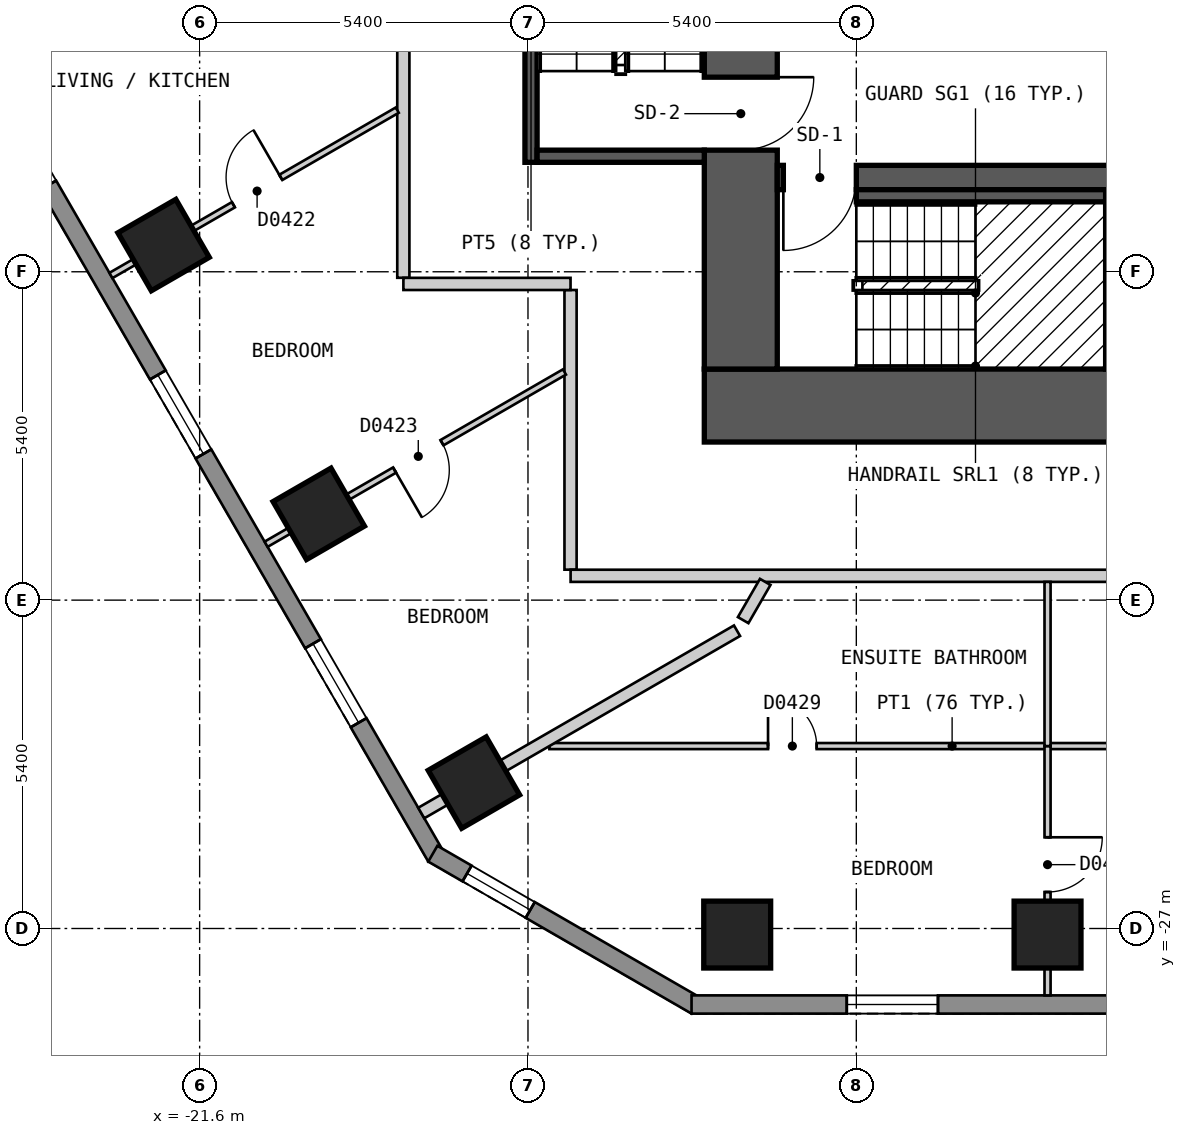
"""IFC4 building model, lengths in metres.
Left out: names, types, materials, properties, quantities, classifications, styles, units other than length and angle.
Written with IfcOpenShell. Run it as: python <this file> out.ifc"""

import sys

from ifc_helpers import new_model, si_unit, direction, frame, frame_2d, origin, origin_2d, place, context, subcontext, project, spatial, polyline, rectangle, outline, extrude, element, fill, save


model = new_model("IFC4")
c1 = context("Model", 3, precision=1e-05, world=origin(), true_north=direction((0.0, 1.0)))
c2 = subcontext(c1, "Body", "Model", "MODEL_VIEW")
j1 = project(units=[si_unit("LENGTHUNIT", "METRE"), si_unit("PLANEANGLEUNIT", "RADIAN")], contexts=[c1])
p1 = place(None, origin())
s1 = spatial("IfcSite", under=j1, at=p1, CompositionType="ELEMENT")
p2 = place(p1, origin())
s2 = spatial("IfcBuilding", under=s1, at=p2, CompositionType="ELEMENT")
p3 = place(p2, frame((0.0, 0.0, 38.4)))
s3 = spatial("IfcBuildingStorey", under=s2, at=p3, CompositionType="ELEMENT", Elevation=38.4)
for number, where, z_axis, x_axis in (
    (1, (-22.193, -15.761, 0.0), (0.0, 0.0, 1.0), (0.5, -0.866, 0.0)),
    (2, (-19.641, -20.181, 0.0), (0.0, 0.0, 1.0), (0.5, -0.866, 0.0)),
    (3, (-17.089, -24.601, 0.0), (0.0, 0.0, 1.0), (0.5, -0.866, 0.0)),
    (4, (-12.759, -27.1, 0.0), (0.0, 0.0, 1.0), (1.0, 0.0, 0.0)),
    (5, (-7.655, -27.1, 0.0), (0.0, 0.0, 1.0), (1.0, 0.0, 0.0)),
):
    element("IfcColumn", number, at=place(p3, frame(where, z_axis=z_axis, x_axis=x_axis)), inside=s3, PredefinedType="COLUMN", context=c2, shape_type="SweptSolid", body=[
        extrude(rectangle(XDim=1.1, YDim=1.1, at=origin_2d()), origin(), (0.0, 0.0, 1.0), 3.0),
    ])
p4 = place(p3, frame((-13.3, -18.4, 0.0), z_axis=(0.0, 0.0, 1.0), x_axis=(1.0, 0.0, 0.0)))
e6 = element("IfcWall", 6, at=p4, inside=s3, PredefinedType="SHEAR", context=c2, shape_type="SweptSolid", body=[
    extrude(rectangle(XDim=26.6, YDim=1.2, at=frame_2d((13.3, 0.0))), origin(), (0.0, 0.0, 1.0), 2.7),
])
p5 = place(p3, frame((-12.7, -17.8, 0.0), z_axis=(0.0, 0.0, 1.0), x_axis=(0.0, 1.0, 0.0)))
e7 = element("IfcWall", 7, at=p5, inside=s3, PredefinedType="SHEAR", context=c2, shape_type="SweptSolid", body=[
    extrude(rectangle(XDim=11.6, YDim=1.2, at=frame_2d((5.8, 0.0))), origin(), (0.0, 0.0, 1.0), 2.7),
])
p6 = place(p5, frame((3.6, 0.0, 0.0)))
e8 = element("IfcOpeningElement", 8, at=p6, cuts=e7, PredefinedType="OPENING", context=c2, shape_type="SweptSolid", body=[
    extrude(rectangle(XDim=1.2, YDim=2.1, at=frame_2d((0.6, 1.05))), frame((0.0, 0.61, 0.0), z_axis=(0.0, -1.0, 0.0), x_axis=(1.0, 0.0, 0.0)), (0.0, 0.0, 1.0), 1.22),
])
p7 = place(p3, frame((-12.1, -14.65, 0.0), z_axis=(0.0, 0.0, 1.0), x_axis=(1.0, 0.0, 0.0)))
e9 = element("IfcWall", 9, at=p7, inside=s3, PredefinedType="SHEAR", context=c2, shape_type="SweptSolid", body=[
    extrude(rectangle(XDim=24.2, YDim=0.4, at=frame_2d((12.1, 0.0))), origin(), (0.0, 0.0, 1.0), 2.7),
])
p8 = place(p7, frame((1.3, 0.0, 0.0), z_axis=(0.0, 0.0, 1.0), x_axis=(-1.0, 0.0, 0.0)))
e10 = element("IfcOpeningElement", 10, at=p8, cuts=e9, PredefinedType="OPENING", context=c2, shape_type="SweptSolid", body=[
    extrude(rectangle(XDim=1.2, YDim=2.1, at=frame_2d((0.6, 1.05))), frame((0.0, 0.21, 0.0), z_axis=(0.0, -1.0, 0.0), x_axis=(1.0, 0.0, 0.0)), (0.0, 0.0, 1.0), 0.42),
])
p9 = place(p7, frame((24.15, 0.0, 0.0), z_axis=(0.0, 0.0, 1.0), x_axis=(-1.0, 0.0, 0.0)))
e11 = element("IfcOpeningElement", 11, at=p9, cuts=e9, PredefinedType="OPENING", context=c2, shape_type="SweptSolid", body=[
    extrude(rectangle(XDim=1.2, YDim=2.1, at=frame_2d((0.6, 1.05))), frame((0.0, 0.21, 0.0), z_axis=(0.0, -1.0, 0.0), x_axis=(1.0, 0.0, 0.0)), (0.0, 0.0, 1.0), 0.42),
])
p10 = place(p7, frame((17.2, 0.0, 0.0), z_axis=(0.0, 0.0, 1.0), x_axis=(-1.0, 0.0, 0.0)))
e12 = element("IfcOpeningElement", 12, at=p10, cuts=e9, PredefinedType="OPENING", context=c2, shape_type="SweptSolid", body=[
    extrude(rectangle(XDim=1.0, YDim=2.1, at=frame_2d((0.5, 1.05))), frame((0.0, 0.21, 0.0), z_axis=(0.0, -1.0, 0.0), x_axis=(1.0, 0.0, 0.0)), (0.0, 0.0, 1.0), 0.42),
])
p11 = place(p3, frame((-31.22, -2.425, 0.0), z_axis=(0.0, 0.0, 1.0), x_axis=(0.500001938803, -0.866024284413, 0.0)))
e13 = element("IfcWall", 13, at=p11, inside=s3, PredefinedType="SOLIDWALL", context=c2, shape_type="SweptSolid", body=[
    extrude(outline(polyline([(0.0, -0.15), (27.02, -0.15), (26.94, 0.15), (0.08, 0.15), (0.0, -0.15)])), origin(), (0.0, 0.0, 1.0), 2.7),
])
p12 = place(p11, frame((2.553, 0.0, 0.15)))
e14 = element("IfcOpeningElement", 14, at=p12, cuts=e13, PredefinedType="OPENING", context=c2, shape_type="SweptSolid", body=[
    extrude(rectangle(XDim=1.5, YDim=2.1, at=frame_2d((0.75, 1.05))), frame((0.0, 0.16, 0.0), z_axis=(0.0, -1.0, 0.0), x_axis=(1.0, 0.0, 0.0)), (0.0, 0.0, 1.0), 0.32),
])
p13 = place(p11, frame((7.657, 0.0, 0.15)))
e15 = element("IfcOpeningElement", 15, at=p13, cuts=e13, PredefinedType="OPENING", context=c2, shape_type="SweptSolid", body=[
    extrude(rectangle(XDim=1.5, YDim=2.1, at=frame_2d((0.75, 1.05))), frame((0.0, 0.16, 0.0), z_axis=(0.0, -1.0, 0.0), x_axis=(1.0, 0.0, 0.0)), (0.0, 0.0, 1.0), 0.32),
])
p14 = place(p11, frame((12.761, 0.0, 0.15)))
e16 = element("IfcOpeningElement", 16, at=p14, cuts=e13, PredefinedType="OPENING", context=c2, shape_type="SweptSolid", body=[
    extrude(rectangle(XDim=1.5, YDim=2.1, at=frame_2d((0.75, 1.05))), frame((0.0, 0.16, 0.0), z_axis=(0.0, -1.0, 0.0), x_axis=(1.0, 0.0, 0.0)), (0.0, 0.0, 1.0), 0.32),
])
p15 = place(p11, frame((17.865, 0.0, 0.15)))
e17 = element("IfcOpeningElement", 17, at=p15, cuts=e13, PredefinedType="OPENING", context=c2, shape_type="SweptSolid", body=[
    extrude(rectangle(XDim=1.5, YDim=2.1, at=frame_2d((0.75, 1.05))), frame((0.0, 0.16, 0.0), z_axis=(0.0, -1.0, 0.0), x_axis=(1.0, 0.0, 0.0)), (0.0, 0.0, 1.0), 0.32),
])
p16 = place(p11, frame((22.969, 0.0, 0.15)))
e18 = element("IfcOpeningElement", 18, at=p16, cuts=e13, PredefinedType="OPENING", context=c2, shape_type="SweptSolid", body=[
    extrude(rectangle(XDim=1.5, YDim=2.1, at=frame_2d((0.75, 1.05))), frame((0.0, 0.16, 0.0), z_axis=(0.0, -1.0, 0.0), x_axis=(1.0, 0.0, 0.0)), (0.0, 0.0, 1.0), 0.32),
])
p17 = place(p3, frame((-17.765, -25.77, 0.0), z_axis=(0.0, 0.0, 1.0), x_axis=(0.866010750942, -0.50002537861, 0.0)))
e19 = element("IfcWall", 19, at=p17, inside=s3, PredefinedType="SOLIDWALL", context=c2, shape_type="SweptSolid", body=[
    extrude(outline(polyline([(0.0, -0.15), (5.0, -0.15), (4.919, 0.15), (0.08, 0.15), (0.0, -0.15)])), origin(), (0.0, 0.0, 1.0), 2.7),
])
p18 = place(p17, frame((0.65, 0.0, 0.15)))
e20 = element("IfcOpeningElement", 20, at=p18, cuts=e19, PredefinedType="OPENING", context=c2, shape_type="SweptSolid", body=[
    extrude(rectangle(XDim=1.2, YDim=2.1, at=frame_2d((0.6, 1.05))), frame((0.0, 0.16, 0.0), z_axis=(0.0, -1.0, 0.0), x_axis=(1.0, 0.0, 0.0)), (0.0, 0.0, 1.0), 0.32),
])
p19 = place(p3, frame((-13.51, -28.25, 0.0), z_axis=(0.0, 0.0, 1.0), x_axis=(1.0, 0.0, 0.0)))
e21 = element("IfcWall", 21, at=p19, inside=s3, PredefinedType="SOLIDWALL", context=c2, shape_type="SweptSolid", body=[
    extrude(outline(polyline([(0.0, -0.15), (27.02, -0.15), (26.94, 0.15), (0.08, 0.15), (0.0, -0.15)])), origin(), (0.0, 0.0, 1.0), 2.7),
])
p20 = place(p19, frame((2.553, 0.0, 0.15)))
e22 = element("IfcOpeningElement", 22, at=p20, cuts=e21, PredefinedType="OPENING", context=c2, shape_type="SweptSolid", body=[
    extrude(rectangle(XDim=1.5, YDim=2.1, at=frame_2d((0.75, 1.05))), frame((0.0, 0.16, 0.0), z_axis=(0.0, -1.0, 0.0), x_axis=(1.0, 0.0, 0.0)), (0.0, 0.0, 1.0), 0.32),
])
p21 = place(p19, frame((7.657, 0.0, 0.15)))
e23 = element("IfcOpeningElement", 23, at=p21, cuts=e21, PredefinedType="OPENING", context=c2, shape_type="SweptSolid", body=[
    extrude(rectangle(XDim=1.5, YDim=2.1, at=frame_2d((0.75, 1.05))), frame((0.0, 0.16, 0.0), z_axis=(0.0, -1.0, 0.0), x_axis=(1.0, 0.0, 0.0)), (0.0, 0.0, 1.0), 0.32),
])
p22 = place(p19, frame((12.761, 0.0, 0.15)))
e24 = element("IfcOpeningElement", 24, at=p22, cuts=e21, PredefinedType="OPENING", context=c2, shape_type="SweptSolid", body=[
    extrude(rectangle(XDim=1.5, YDim=2.1, at=frame_2d((0.75, 1.05))), frame((0.0, 0.16, 0.0), z_axis=(0.0, -1.0, 0.0), x_axis=(1.0, 0.0, 0.0)), (0.0, 0.0, 1.0), 0.32),
])
p23 = place(p19, frame((17.865, 0.0, 0.15)))
e25 = element("IfcOpeningElement", 25, at=p23, cuts=e21, PredefinedType="OPENING", context=c2, shape_type="SweptSolid", body=[
    extrude(rectangle(XDim=1.5, YDim=2.1, at=frame_2d((0.75, 1.05))), frame((0.0, 0.16, 0.0), z_axis=(0.0, -1.0, 0.0), x_axis=(1.0, 0.0, 0.0)), (0.0, 0.0, 1.0), 0.32),
])
p24 = place(p19, frame((22.969, 0.0, 0.15)))
e26 = element("IfcOpeningElement", 26, at=p24, cuts=e21, PredefinedType="OPENING", context=c2, shape_type="SweptSolid", body=[
    extrude(rectangle(XDim=1.5, YDim=2.1, at=frame_2d((0.75, 1.05))), frame((0.0, 0.16, 0.0), z_axis=(0.0, -1.0, 0.0), x_axis=(1.0, 0.0, 0.0)), (0.0, 0.0, 1.0), 0.32),
])
p25 = place(p3, frame((-15.5, -16.5, 0.0), z_axis=(0.0, 0.0, 1.0), x_axis=(0.0, -1.0, 0.0)))
e27 = element("IfcWall", 27, at=p25, inside=s3, PredefinedType="PARTITIONING", context=c2, shape_type="SweptSolid", body=[
    extrude(rectangle(XDim=4.599, YDim=0.2, at=frame_2d((2.3, 0.0))), origin(), (0.0, 0.0, 1.0), 2.7),
])
p26 = place(p3, frame((-18.25, -11.507, 0.0), z_axis=(0.0, 0.0, 1.0), x_axis=(0.0, -1.0, 0.0)))
e28 = element("IfcWall", 28, at=p26, inside=s3, PredefinedType="PARTITIONING", context=c2, shape_type="SweptSolid", body=[
    extrude(rectangle(XDim=4.792, YDim=0.2, at=frame_2d((2.396, 0.0))), origin(), (0.0, 0.0, 1.0), 2.7),
])
p27 = place(p3, frame((-18.249, -16.4, 0.0), z_axis=(0.0, 0.0, 1.0), x_axis=(1.0, 0.0, 0.0)))
e29 = element("IfcWall", 29, at=p27, inside=s3, PredefinedType="PARTITIONING", context=c2, shape_type="SweptSolid", body=[
    extrude(rectangle(XDim=2.749, YDim=0.2, at=frame_2d((1.375, 0.0))), origin(), (0.0, 0.0, 1.0), 2.7),
])
p28 = place(p3, frame((-15.499, -21.2, 0.0), z_axis=(0.0, 0.0, 1.0), x_axis=(1.0, 0.0, 0.0)))
e30 = element("IfcWall", 30, at=p28, inside=s3, PredefinedType="PARTITIONING", context=c2, shape_type="SweptSolid", body=[
    extrude(rectangle(XDim=30.898, YDim=0.2, at=frame_2d((15.449, 0.0))), origin(), (0.0, 0.0, 1.0), 2.7),
])
p29 = place(p28, frame((15.0, 0.0, 0.0)))
e31 = element("IfcOpeningElement", 31, at=p29, cuts=e30, PredefinedType="OPENING", context=c2, shape_type="SweptSolid", body=[
    extrude(rectangle(XDim=1.0, YDim=2.1, at=frame_2d((0.5, 1.05))), frame((0.0, 0.11, 0.0), z_axis=(0.0, -1.0, 0.0), x_axis=(1.0, 0.0, 0.0)), (0.0, 0.0, 1.0), 0.22),
])
p30 = place(p28, frame((20.104, 0.0, 0.0)))
e32 = element("IfcOpeningElement", 32, at=p30, cuts=e30, PredefinedType="OPENING", context=c2, shape_type="SweptSolid", body=[
    extrude(rectangle(XDim=1.0, YDim=2.1, at=frame_2d((0.5, 1.05))), frame((0.0, 0.11, 0.0), z_axis=(0.0, -1.0, 0.0), x_axis=(1.0, 0.0, 0.0)), (0.0, 0.0, 1.0), 0.22),
])
p31 = place(p3, frame((-15.848, -24.0, 0.0), z_axis=(0.0, 0.0, 1.0), x_axis=(1.0, 0.0, 0.0)))
e33 = element("IfcWall", 33, at=p31, inside=s3, PredefinedType="PARTITIONING", context=c2, shape_type="SweptSolid", body=[
    extrude(rectangle(XDim=13.247, YDim=0.1, at=frame_2d((6.624, 0.0))), origin(), (0.0, 0.0, 1.0), 2.7),
])
p32 = place(p31, frame((3.596, 0.0, 0.0)))
e34 = element("IfcOpeningElement", 34, at=p32, cuts=e33, PredefinedType="OPENING", context=c2, shape_type="SweptSolid", body=[
    extrude(rectangle(XDim=0.8, YDim=2.1, at=frame_2d((0.4, 1.05))), frame((0.0, 0.06, 0.0), z_axis=(0.0, -1.0, 0.0), x_axis=(1.0, 0.0, 0.0)), (0.0, 0.0, 1.0), 0.12),
])
p33 = place(p31, frame((10.345, 0.0, 0.0)))
e35 = element("IfcOpeningElement", 35, at=p33, cuts=e33, PredefinedType="OPENING", context=c2, shape_type="SweptSolid", body=[
    extrude(rectangle(XDim=0.8, YDim=2.1, at=frame_2d((0.4, 1.05))), frame((0.0, 0.06, 0.0), z_axis=(0.0, -1.0, 0.0), x_axis=(1.0, 0.0, 0.0)), (0.0, 0.0, 1.0), 0.12),
])
p34 = place(p3, frame((-7.655, -28.1, 0.0), z_axis=(0.0, 0.0, 1.0), x_axis=(0.0, 1.0, 0.0)))
e36 = element("IfcWall", 36, at=p34, inside=s3, PredefinedType="PARTITIONING", context=c2, shape_type="SweptSolid", body=[
    extrude(rectangle(XDim=4.1, YDim=0.1, at=frame_2d((2.05, 0.0))), origin(), (0.0, 0.0, 1.0), 2.7),
])
p35 = place(p34, frame((1.7, 0.0, 0.0)))
e37 = element("IfcOpeningElement", 37, at=p35, cuts=e36, PredefinedType="OPENING", context=c2, shape_type="SweptSolid", body=[
    extrude(rectangle(XDim=0.9, YDim=2.1, at=frame_2d((0.45, 1.05))), frame((0.0, 0.06, 0.0), z_axis=(0.0, -1.0, 0.0), x_axis=(1.0, 0.0, 0.0)), (0.0, 0.0, 1.0), 0.12),
])
p36 = place(p3, frame((-20.507, -20.681, 0.0), z_axis=(0.0, 0.0, 1.0), x_axis=(0.866028446103, 0.499994730513, 0.0)))
e38 = element("IfcWall", 38, at=p36, inside=s3, PredefinedType="PARTITIONING", context=c2, shape_type="SweptSolid", body=[
    extrude(rectangle(XDim=5.666, YDim=0.1, at=frame_2d((2.833, 0.0))), origin(), (0.0, 0.0, 1.0), 2.7),
])
p37 = place(p36, frame((2.44, 0.0, 0.0)))
e39 = element("IfcOpeningElement", 39, at=p37, cuts=e38, PredefinedType="OPENING", context=c2, shape_type="SweptSolid", body=[
    extrude(rectangle(XDim=0.9, YDim=2.1, at=frame_2d((0.45, 1.05))), frame((0.0, 0.06, 0.0), z_axis=(0.0, -1.0, 0.0), x_axis=(1.0, 0.0, 0.0)), (0.0, 0.0, 1.0), 0.12),
])
p38 = place(p3, frame((-23.059, -16.261, 0.0), z_axis=(0.0, 0.0, 1.0), x_axis=(0.866004639177, 0.500035963631, 0.0)))
e40 = element("IfcWall", 40, at=p38, inside=s3, PredefinedType="PARTITIONING", context=c2, shape_type="SweptSolid", body=[
    extrude(rectangle(XDim=5.438, YDim=0.1, at=frame_2d((2.719, 0.0))), origin(), (0.0, 0.0, 1.0), 2.7),
])
p39 = place(p38, frame((2.326, 0.0, 0.0)))
e41 = element("IfcOpeningElement", 41, at=p39, cuts=e40, PredefinedType="OPENING", context=c2, shape_type="SweptSolid", body=[
    extrude(rectangle(XDim=0.9, YDim=2.1, at=frame_2d((0.45, 1.05))), frame((0.0, 0.06, 0.0), z_axis=(0.0, -1.0, 0.0), x_axis=(1.0, 0.0, 0.0)), (0.0, 0.0, 1.0), 0.12),
])
p40 = place(p3, frame((-12.661, -21.929, 0.0), z_axis=(0.0, 0.0, 1.0), x_axis=(0.499683639304, 0.866207977689, 0.0)))
e42 = element("IfcWall", 42, at=p40, inside=s3, PredefinedType="PARTITIONING", context=c2, shape_type="SweptSolid", body=[
    extrude(rectangle(XDim=0.726, YDim=0.2, at=frame_2d((0.363, 0.0))), origin(), (0.0, 0.0, 1.0), 2.7),
])
p41 = place(p3, frame((-17.955, -25.101, 0.0), z_axis=(0.0, 0.0, 1.0), x_axis=(0.866039817231, 0.499975034347, 0.0)))
e43 = element("IfcWall", 43, at=p41, inside=s3, PredefinedType="PARTITIONING", context=c2, shape_type="SweptSolid", body=[
    extrude(rectangle(XDim=5.996, YDim=0.2, at=frame_2d((2.998, 0.0))), origin(), (0.0, 0.0, 1.0), 2.7),
])
p42 = place(p3, frame((-7.655, -24.0, 0.0), z_axis=(0.0, 0.0, 1.0), x_axis=(0.0, 1.0, 0.0)))
e44 = element("IfcWall", 44, at=p42, inside=s3, PredefinedType="PARTITIONING", context=c2, shape_type="SweptSolid", body=[
    extrude(rectangle(XDim=2.7, YDim=0.1, at=frame_2d((1.35, 0.0))), origin(), (0.0, 0.0, 1.0), 2.7),
])
p43 = place(p3, frame((-16.15, -14.4, 0.0), z_axis=(0.0, 0.0, 1.0), x_axis=(0.0, 1.0, 0.0)))
e45 = element("IfcWall", 45, at=p43, inside=s3, PredefinedType="SOLIDWALL", context=c2, shape_type="SweptSolid", body=[
    extrude(rectangle(XDim=5.8, YDim=0.2, at=frame_2d((2.9, 0.0))), origin(), (0.0, 0.0, 1.0), 2.7),
])
p44 = place(p3, frame((-16.05, -14.3, 0.0), z_axis=(0.0, 0.0, 1.0), x_axis=(1.0, 0.0, 0.0)))
e46 = element("IfcWall", 46, at=p44, inside=s3, PredefinedType="SOLIDWALL", context=c2, shape_type="SweptSolid", body=[
    extrude(rectangle(XDim=2.75, YDim=0.2, at=frame_2d((1.375, 0.0))), origin(), (0.0, 0.0, 1.0), 2.7),
])
p45 = place(p3, frame((-10.8, -14.95, 0.0), z_axis=(0.0, 0.0, 1.0), x_axis=(1.0, 0.0, 0.0)))
e47 = element("IfcWall", 47, at=p45, inside=s3, PredefinedType="SOLIDWALL", context=c2, shape_type="SweptSolid", body=[
    extrude(rectangle(XDim=4.1, YDim=0.2, at=frame_2d((2.05, 0.0))), origin(), (0.0, 0.0, 1.0), 2.7),
])
p46 = place(p15, origin())
e48 = element("IfcWindow", 48, at=p46, inside=s3, PartitioningType="SINGLE_PANEL", PredefinedType="WINDOW", context=c2, shape_type="SweptSolid", body=[
    extrude(rectangle(XDim=1.5, YDim=2.1, at=frame_2d((0.75, 1.05))), frame((0.0, 0.03, 0.0), z_axis=(0.0, -1.0, 0.0), x_axis=(1.0, 0.0, 0.0)), (0.0, 0.0, 1.0), 0.06),
])
fill(e17, e48)
p47 = place(p16, origin())
e49 = element("IfcWindow", 49, at=p47, inside=s3, PartitioningType="SINGLE_PANEL", PredefinedType="WINDOW", context=c2, shape_type="SweptSolid", body=[
    extrude(rectangle(XDim=1.5, YDim=2.1, at=frame_2d((0.75, 1.05))), frame((0.0, 0.03, 0.0), z_axis=(0.0, -1.0, 0.0), x_axis=(1.0, 0.0, 0.0)), (0.0, 0.0, 1.0), 0.06),
])
fill(e18, e49)
p48 = place(p18, origin())
e50 = element("IfcWindow", 50, at=p48, inside=s3, PartitioningType="SINGLE_PANEL", PredefinedType="WINDOW", context=c2, shape_type="SweptSolid", body=[
    extrude(rectangle(XDim=1.2, YDim=2.1, at=frame_2d((0.6, 1.05))), frame((0.0, 0.03, 0.0), z_axis=(0.0, -1.0, 0.0), x_axis=(1.0, 0.0, 0.0)), (0.0, 0.0, 1.0), 0.06),
])
fill(e20, e50)
p49 = place(p20, origin())
e51 = element("IfcWindow", 51, at=p49, inside=s3, PartitioningType="SINGLE_PANEL", PredefinedType="WINDOW", context=c2, shape_type="SweptSolid", body=[
    extrude(rectangle(XDim=1.5, YDim=2.1, at=frame_2d((0.75, 1.05))), frame((0.0, 0.03, 0.0), z_axis=(0.0, -1.0, 0.0), x_axis=(1.0, 0.0, 0.0)), (0.0, 0.0, 1.0), 0.06),
])
fill(e22, e51)
p50 = place(p39, origin())
e52 = element("IfcDoor", 52, at=p50, inside=s3, OperationType="SINGLE_SWING_RIGHT", PredefinedType="DOOR", context=c2, shape_type="SweptSolid", body=[
    extrude(rectangle(XDim=0.9, YDim=2.1, at=frame_2d((0.45, 1.05))), frame((0.0, 0.025, 0.0), z_axis=(0.0, -1.0, 0.0), x_axis=(1.0, 0.0, 0.0)), (0.0, 0.0, 1.0), 0.05),
])
fill(e41, e52)
p51 = place(p37, origin())
e53 = element("IfcDoor", 53, at=p51, inside=s3, OperationType="SINGLE_SWING_LEFT", PredefinedType="DOOR", context=c2, shape_type="SweptSolid", body=[
    extrude(rectangle(XDim=0.9, YDim=2.1, at=frame_2d((0.45, 1.05))), frame((0.0, 0.025, 0.0), z_axis=(0.0, -1.0, 0.0), x_axis=(1.0, 0.0, 0.0)), (0.0, 0.0, 1.0), 0.05),
])
fill(e39, e53)
p52 = place(p35, origin())
e54 = element("IfcDoor", 54, at=p52, inside=s3, OperationType="SINGLE_SWING_RIGHT", PredefinedType="DOOR", context=c2, shape_type="SweptSolid", body=[
    extrude(rectangle(XDim=0.9, YDim=2.1, at=frame_2d((0.45, 1.05))), frame((0.0, 0.025, 0.0), z_axis=(0.0, -1.0, 0.0), x_axis=(1.0, 0.0, 0.0)), (0.0, 0.0, 1.0), 0.05),
])
fill(e37, e54)
p53 = place(p32, origin())
e55 = element("IfcDoor", 55, at=p53, inside=s3, OperationType="SINGLE_SWING_LEFT", PredefinedType="DOOR", context=c2, shape_type="SweptSolid", body=[
    extrude(rectangle(XDim=0.8, YDim=2.1, at=frame_2d((0.4, 1.05))), frame((0.0, 0.025, 0.0), z_axis=(0.0, -1.0, 0.0), x_axis=(1.0, 0.0, 0.0)), (0.0, 0.0, 1.0), 0.05),
])
fill(e34, e55)
p54 = place(p8, origin())
e56 = element("IfcDoor", 56, at=p54, inside=s3, OperationType="SINGLE_SWING_RIGHT", PredefinedType="DOOR", context=c2, shape_type="SweptSolid", body=[
    extrude(rectangle(XDim=1.2, YDim=2.1, at=frame_2d((0.6, 1.05))), frame((0.0, 0.025, 0.0), z_axis=(0.0, -1.0, 0.0), x_axis=(1.0, 0.0, 0.0)), (0.0, 0.0, 1.0), 0.05),
])
fill(e10, e56)
p55 = place(p6, origin())
e57 = element("IfcDoor", 57, at=p55, inside=s3, OperationType="SINGLE_SWING_RIGHT", PredefinedType="DOOR", context=c2, shape_type="SweptSolid", body=[
    extrude(rectangle(XDim=1.2, YDim=2.1, at=frame_2d((0.6, 1.05))), frame((0.0, 0.025, 0.0), z_axis=(0.0, -1.0, 0.0), x_axis=(1.0, 0.0, 0.0)), (0.0, 0.0, 1.0), 0.05),
])
fill(e8, e57)
save(model, sys.argv[1])
